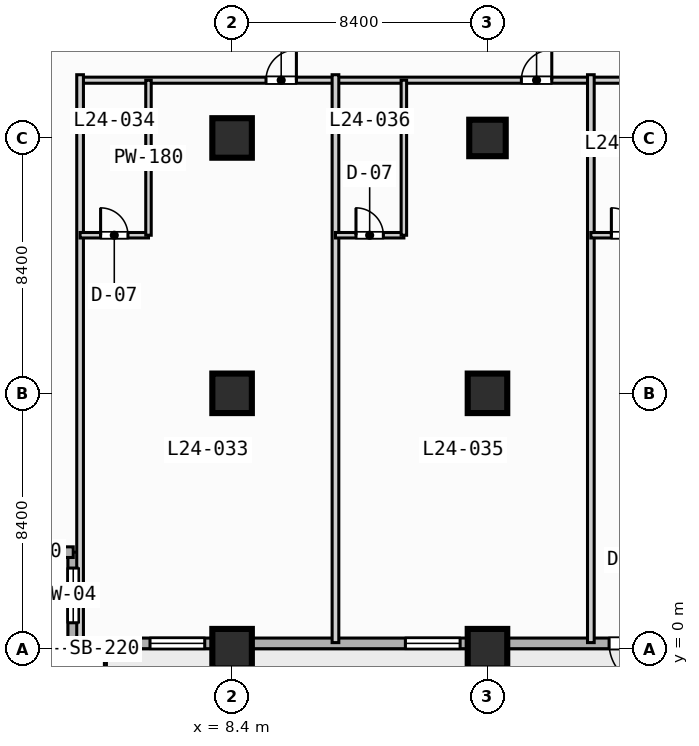
"""IFC4 building model, lengths in metres.
Left out: names, types, materials, properties, quantities, classifications, styles, units other than length and angle.
Written with IfcOpenShell. Run it as: python <this file> out.ifc"""

import sys

from ifc_helpers import new_model, si_unit, direction, frame, frame_2d, origin, origin_2d, place, context, subcontext, project, spatial, rectangle, extrude, element, fill, save


model = new_model("IFC4")
c1 = context("Model", 3, precision=1e-05, world=origin(), true_north=direction((0.0, 1.0)))
c2 = subcontext(c1, "Body", "Model", "MODEL_VIEW")
j1 = project(units=[si_unit("LENGTHUNIT", "METRE"), si_unit("PLANEANGLEUNIT", "RADIAN")], contexts=[c1])
p1 = place(None, origin())
s1 = spatial("IfcSite", under=j1, at=p1, CompositionType="ELEMENT")
p2 = place(p1, origin())
s2 = spatial("IfcBuilding", under=s1, at=p2, CompositionType="ELEMENT")
p3 = place(p2, frame((0.0, 0.0, 103.8)))
s3 = spatial("IfcBuildingStorey", under=s2, at=p3, CompositionType="ELEMENT", Elevation=103.8)
for number, where, z_axis, x_axis in (
    (1, (8.4, 0.0, 0.0), (0.0, 0.0, 1.0), (1.0, 0.0, 0.0)),
    (2, (8.4, 8.4, 0.0), (0.0, 0.0, 1.0), (1.0, 0.0, 0.0)),
    (3, (8.4, 16.8, 0.0), (0.0, 0.0, 1.0), (1.0, 0.0, 0.0)),
    (4, (16.8, 0.0, 0.0), (0.0, 0.0, 1.0), (1.0, 0.0, 0.0)),
    (5, (16.8, 8.4, 0.0), (0.0, 0.0, 1.0), (1.0, 0.0, 0.0)),
):
    element("IfcColumn", number, at=place(p3, frame(where, z_axis=z_axis, x_axis=x_axis)), inside=s3, PredefinedType="COLUMN", context=c2, shape_type="SweptSolid", body=[
        extrude(rectangle(XDim=1.3, YDim=1.3, at=origin_2d()), origin(), (0.0, 0.0, 1.0), 3.8),
    ])
p4 = place(p3, frame((16.8, 16.8, 0.0), z_axis=(0.0, 0.0, 1.0), x_axis=(1.0, 0.0, 0.0)))
e6 = element("IfcColumn", 6, at=p4, inside=s3, PredefinedType="COLUMN", context=c2, shape_type="SweptSolid", body=[
    extrude(rectangle(XDim=1.2, YDim=1.2, at=origin_2d()), origin(), (0.0, 0.0, 1.0), 3.8),
])
p5 = place(p3, frame((3.175, 0.175, 0.0), z_axis=(0.0, 0.0, 1.0), x_axis=(0.0, 1.0, 0.0)))
e7 = element("IfcWall", 7, at=p5, inside=s3, PredefinedType="STANDARD", context=c2, shape_type="SweptSolid", body=[
    extrude(rectangle(XDim=3.0, YDim=0.35, at=frame_2d((1.5, 0.0))), origin(), (0.0, 0.0, 1.0), 3.55),
])
p6 = place(p5, frame((0.677, 0.0, 0.85)))
e8 = element("IfcOpeningElement", 8, at=p6, cuts=e7, PredefinedType="OPENING", context=c2, shape_type="SweptSolid", body=[
    extrude(rectangle(XDim=1.8, YDim=1.8, at=frame_2d((0.9, 0.9))), frame((0.0, 0.185, 0.0), z_axis=(0.0, -1.0, 0.0), x_axis=(1.0, 0.0, 0.0)), (0.0, 0.0, 1.0), 0.37),
])
p7 = place(p3, frame((3.175, 3.175, 0.0), z_axis=(0.0, 0.0, 1.0), x_axis=(-1.0, 0.0, 0.0)))
e9 = element("IfcWall", 9, at=p7, inside=s3, PredefinedType="STANDARD", context=c2, shape_type="SweptSolid", body=[
    extrude(rectangle(XDim=3.0, YDim=0.35, at=frame_2d((1.5, 0.0))), origin(), (0.0, 0.0, 1.0), 3.55),
])
p8 = place(p3, frame((72.425, 0.175, 0.0), z_axis=(0.0, 0.0, 1.0), x_axis=(-1.0, 0.0, 0.0)))
e10 = element("IfcWall", 10, at=p8, inside=s3, PredefinedType="STANDARD", context=c2, shape_type="SweptSolid", body=[
    extrude(rectangle(XDim=69.25, YDim=0.35, at=frame_2d((34.625, 0.0))), origin(), (0.0, 0.0, 1.0), 3.55),
])
p9 = place(p8, frame((50.225, 0.0, 0.0)))
e11 = element("IfcOpeningElement", 11, at=p9, cuts=e10, PredefinedType="OPENING", context=c2, shape_type="SweptSolid", body=[
    extrude(rectangle(XDim=1.4, YDim=2.2, at=frame_2d((0.7, 1.1))), frame((0.0, 0.185, 0.0), z_axis=(0.0, -1.0, 0.0), x_axis=(1.0, 0.0, 0.0)), (0.0, 0.0, 1.0), 0.37),
])
p10 = place(p8, frame((33.525, 0.0, 0.85)))
e12 = element("IfcOpeningElement", 12, at=p10, cuts=e10, PredefinedType="OPENING", context=c2, shape_type="SweptSolid", body=[
    extrude(rectangle(XDim=2.2, YDim=1.8, at=frame_2d((1.1, 0.9))), frame((0.0, 0.185, 0.0), z_axis=(0.0, -1.0, 0.0), x_axis=(1.0, 0.0, 0.0)), (0.0, 0.0, 1.0), 0.37),
])
p11 = place(p8, frame((25.125, 0.0, 0.85)))
e13 = element("IfcOpeningElement", 13, at=p11, cuts=e10, PredefinedType="OPENING", context=c2, shape_type="SweptSolid", body=[
    extrude(rectangle(XDim=2.2, YDim=1.8, at=frame_2d((1.1, 0.9))), frame((0.0, 0.185, 0.0), z_axis=(0.0, -1.0, 0.0), x_axis=(1.0, 0.0, 0.0)), (0.0, 0.0, 1.0), 0.37),
])
p12 = place(p8, frame((8.325, 0.0, 0.85)))
e14 = element("IfcOpeningElement", 14, at=p12, cuts=e10, PredefinedType="OPENING", context=c2, shape_type="SweptSolid", body=[
    extrude(rectangle(XDim=2.2, YDim=1.8, at=frame_2d((1.1, 0.9))), frame((0.0, 0.185, 0.0), z_axis=(0.0, -1.0, 0.0), x_axis=(1.0, 0.0, 0.0)), (0.0, 0.0, 1.0), 0.37),
])
p13 = place(p8, frame((64.925, 0.0, 0.85)))
e15 = element("IfcOpeningElement", 15, at=p13, cuts=e10, PredefinedType="OPENING", context=c2, shape_type="SweptSolid", body=[
    extrude(rectangle(XDim=1.8, YDim=1.8, at=frame_2d((0.9, 0.9))), frame((0.0, 0.185, 0.0), z_axis=(0.0, -1.0, 0.0), x_axis=(1.0, 0.0, 0.0)), (0.0, 0.0, 1.0), 0.37),
])
p14 = place(p8, frame((56.525, 0.0, 0.85)))
e16 = element("IfcOpeningElement", 16, at=p14, cuts=e10, PredefinedType="OPENING", context=c2, shape_type="SweptSolid", body=[
    extrude(rectangle(XDim=1.8, YDim=1.8, at=frame_2d((0.9, 0.9))), frame((0.0, 0.185, 0.0), z_axis=(0.0, -1.0, 0.0), x_axis=(1.0, 0.0, 0.0)), (0.0, 0.0, 1.0), 0.37),
])
p15 = place(p8, frame((2.125, 0.0, 0.85)))
e17 = element("IfcOpeningElement", 17, at=p15, cuts=e10, PredefinedType="OPENING", context=c2, shape_type="SweptSolid", body=[
    extrude(rectangle(XDim=1.8, YDim=1.8, at=frame_2d((0.9, 0.9))), frame((0.0, 0.185, 0.0), z_axis=(0.0, -1.0, 0.0), x_axis=(1.0, 0.0, 0.0)), (0.0, 0.0, 1.0), 0.37),
])
p16 = place(p3, frame((3.4, 18.7, 0.0), z_axis=(0.0, 0.0, 1.0), x_axis=(1.0, 0.0, 0.0)))
e18 = element("IfcWall", 18, at=p16, inside=s3, PredefinedType="PARTITIONING", context=c2, shape_type="SweptSolid", body=[
    extrude(rectangle(XDim=35.8, YDim=0.2, at=frame_2d((17.9, 0.0))), origin(), (0.0, 0.0, 1.0), 3.55),
])
p17 = place(p16, frame((6.115, 0.0, 0.0)))
e19 = element("IfcOpeningElement", 19, at=p17, cuts=e18, PredefinedType="OPENING", context=c2, shape_type="SweptSolid", body=[
    extrude(rectangle(XDim=1.0, YDim=2.15, at=frame_2d((0.5, 1.075))), frame((0.0, 0.11, 0.0), z_axis=(0.0, -1.0, 0.0), x_axis=(1.0, 0.0, 0.0)), (0.0, 0.0, 1.0), 0.22),
])
p18 = place(p16, frame((14.515, 0.0, 0.0)))
e20 = element("IfcOpeningElement", 20, at=p18, cuts=e18, PredefinedType="OPENING", context=c2, shape_type="SweptSolid", body=[
    extrude(rectangle(XDim=1.0, YDim=2.15, at=frame_2d((0.5, 1.075))), frame((0.0, 0.11, 0.0), z_axis=(0.0, -1.0, 0.0), x_axis=(1.0, 0.0, 0.0)), (0.0, 0.0, 1.0), 0.22),
])
p19 = place(p16, frame((22.915, 0.0, 0.0)))
e21 = element("IfcOpeningElement", 21, at=p19, cuts=e18, PredefinedType="OPENING", context=c2, shape_type="SweptSolid", body=[
    extrude(rectangle(XDim=1.0, YDim=2.15, at=frame_2d((0.5, 1.075))), frame((0.0, 0.11, 0.0), z_axis=(0.0, -1.0, 0.0), x_axis=(1.0, 0.0, 0.0)), (0.0, 0.0, 1.0), 0.22),
])
p20 = place(p16, frame((31.165, 0.0, 0.0)))
e22 = element("IfcOpeningElement", 22, at=p20, cuts=e18, PredefinedType="OPENING", context=c2, shape_type="SweptSolid", body=[
    extrude(rectangle(XDim=1.0, YDim=2.15, at=frame_2d((0.5, 1.075))), frame((0.0, 0.11, 0.0), z_axis=(0.0, -1.0, 0.0), x_axis=(1.0, 0.0, 0.0)), (0.0, 0.0, 1.0), 0.22),
])
p21 = place(p3, frame((3.4, 0.2, 0.0), z_axis=(0.0, 0.0, 1.0), x_axis=(0.0, 1.0, 0.0)))
e23 = element("IfcWall", 23, at=p21, inside=s3, PredefinedType="PARTITIONING", context=c2, shape_type="SweptSolid", body=[
    extrude(rectangle(XDim=18.68, YDim=0.22, at=frame_2d((9.34, 0.0))), origin(), (0.0, 0.0, 1.0), 3.55),
])
p22 = place(p3, frame((3.4, 13.6, 0.0), z_axis=(0.0, 0.0, 1.0), x_axis=(1.0, 0.0, 0.0)))
e24 = element("IfcWall", 24, at=p22, inside=s3, PredefinedType="PLUMBINGWALL", context=c2, shape_type="SweptSolid", body=[
    extrude(rectangle(XDim=2.25, YDim=0.18, at=frame_2d((1.125, 0.0))), origin(), (0.0, 0.0, 1.0), 3.55),
])
p23 = place(p22, frame((0.675, 0.0, 0.0)))
e25 = element("IfcOpeningElement", 25, at=p23, cuts=e24, PredefinedType="OPENING", context=c2, shape_type="SweptSolid", body=[
    extrude(rectangle(XDim=0.9, YDim=2.1, at=frame_2d((0.45, 1.05))), frame((0.0, 0.1, 0.0), z_axis=(0.0, -1.0, 0.0), x_axis=(1.0, 0.0, 0.0)), (0.0, 0.0, 1.0), 0.2),
])
p24 = place(p3, frame((5.65, 13.6, 0.0), z_axis=(0.0, 0.0, 1.0), x_axis=(0.0, 1.0, 0.0)))
e26 = element("IfcWall", 26, at=p24, inside=s3, PredefinedType="PLUMBINGWALL", context=c2, shape_type="SweptSolid", body=[
    extrude(rectangle(XDim=5.1, YDim=0.18, at=frame_2d((2.55, 0.0))), origin(), (0.0, 0.0, 1.0), 3.55),
])
p25 = place(p3, frame((11.8, 0.2, 0.0), z_axis=(0.0, 0.0, 1.0), x_axis=(0.0, 1.0, 0.0)))
e27 = element("IfcWall", 27, at=p25, inside=s3, PredefinedType="PARTITIONING", context=c2, shape_type="SweptSolid", body=[
    extrude(rectangle(XDim=18.68, YDim=0.22, at=frame_2d((9.34, 0.0))), origin(), (0.0, 0.0, 1.0), 3.55),
])
p26 = place(p3, frame((11.8, 13.6, 0.0), z_axis=(0.0, 0.0, 1.0), x_axis=(1.0, 0.0, 0.0)))
e28 = element("IfcWall", 28, at=p26, inside=s3, PredefinedType="PLUMBINGWALL", context=c2, shape_type="SweptSolid", body=[
    extrude(rectangle(XDim=2.25, YDim=0.18, at=frame_2d((1.125, 0.0))), origin(), (0.0, 0.0, 1.0), 3.55),
])
p27 = place(p26, frame((0.675, 0.0, 0.0)))
e29 = element("IfcOpeningElement", 29, at=p27, cuts=e28, PredefinedType="OPENING", context=c2, shape_type="SweptSolid", body=[
    extrude(rectangle(XDim=0.9, YDim=2.1, at=frame_2d((0.45, 1.05))), frame((0.0, 0.1, 0.0), z_axis=(0.0, -1.0, 0.0), x_axis=(1.0, 0.0, 0.0)), (0.0, 0.0, 1.0), 0.2),
])
p28 = place(p3, frame((14.05, 13.6, 0.0), z_axis=(0.0, 0.0, 1.0), x_axis=(0.0, 1.0, 0.0)))
e30 = element("IfcWall", 30, at=p28, inside=s3, PredefinedType="PLUMBINGWALL", context=c2, shape_type="SweptSolid", body=[
    extrude(rectangle(XDim=5.1, YDim=0.18, at=frame_2d((2.55, 0.0))), origin(), (0.0, 0.0, 1.0), 3.55),
])
p29 = place(p3, frame((20.2, 0.2, 0.0), z_axis=(0.0, 0.0, 1.0), x_axis=(0.0, 1.0, 0.0)))
e31 = element("IfcWall", 31, at=p29, inside=s3, PredefinedType="PARTITIONING", context=c2, shape_type="SweptSolid", body=[
    extrude(rectangle(XDim=18.68, YDim=0.22, at=frame_2d((9.34, 0.0))), origin(), (0.0, 0.0, 1.0), 3.55),
])
p30 = place(p3, frame((20.2, 13.6, 0.0), z_axis=(0.0, 0.0, 1.0), x_axis=(1.0, 0.0, 0.0)))
e32 = element("IfcWall", 32, at=p30, inside=s3, PredefinedType="PLUMBINGWALL", context=c2, shape_type="SweptSolid", body=[
    extrude(rectangle(XDim=2.25, YDim=0.18, at=frame_2d((1.125, 0.0))), origin(), (0.0, 0.0, 1.0), 3.55),
])
p31 = place(p30, frame((0.675, 0.0, 0.0)))
e33 = element("IfcOpeningElement", 33, at=p31, cuts=e32, PredefinedType="OPENING", context=c2, shape_type="SweptSolid", body=[
    extrude(rectangle(XDim=0.9, YDim=2.1, at=frame_2d((0.45, 1.05))), frame((0.0, 0.1, 0.0), z_axis=(0.0, -1.0, 0.0), x_axis=(1.0, 0.0, 0.0)), (0.0, 0.0, 1.0), 0.2),
])
p32 = place(p6, origin())
e34 = element("IfcWindow", 34, at=p32, inside=s3, PartitioningType="SINGLE_PANEL", PredefinedType="WINDOW", context=c2, shape_type="SweptSolid", body=[
    extrude(rectangle(XDim=1.8, YDim=1.8, at=frame_2d((0.9, 0.9))), frame((0.0, 0.03, 0.0), z_axis=(0.0, -1.0, 0.0), x_axis=(1.0, 0.0, 0.0)), (0.0, 0.0, 1.0), 0.06),
])
fill(e8, e34)
p33 = place(p9, origin())
e35 = element("IfcDoor", 35, at=p33, inside=s3, OperationType="SINGLE_SWING_LEFT", PredefinedType="DOOR", context=c2, shape_type="SweptSolid", body=[
    extrude(rectangle(XDim=1.4, YDim=2.2, at=frame_2d((0.7, 1.1))), frame((0.0, 0.025, 0.0), z_axis=(0.0, -1.0, 0.0), x_axis=(1.0, 0.0, 0.0)), (0.0, 0.0, 1.0), 0.05),
])
fill(e11, e35)
p34 = place(p13, origin())
e36 = element("IfcWindow", 36, at=p34, inside=s3, PartitioningType="SINGLE_PANEL", PredefinedType="WINDOW", context=c2, shape_type="SweptSolid", body=[
    extrude(rectangle(XDim=1.8, YDim=1.8, at=frame_2d((0.9, 0.9))), frame((0.0, 0.03, 0.0), z_axis=(0.0, -1.0, 0.0), x_axis=(1.0, 0.0, 0.0)), (0.0, 0.0, 1.0), 0.06),
])
fill(e15, e36)
p35 = place(p14, origin())
e37 = element("IfcWindow", 37, at=p35, inside=s3, PartitioningType="SINGLE_PANEL", PredefinedType="WINDOW", context=c2, shape_type="SweptSolid", body=[
    extrude(rectangle(XDim=1.8, YDim=1.8, at=frame_2d((0.9, 0.9))), frame((0.0, 0.03, 0.0), z_axis=(0.0, -1.0, 0.0), x_axis=(1.0, 0.0, 0.0)), (0.0, 0.0, 1.0), 0.06),
])
fill(e16, e37)
p36 = place(p17, origin())
e38 = element("IfcDoor", 38, at=p36, inside=s3, OperationType="SINGLE_SWING_RIGHT", PredefinedType="DOOR", context=c2, shape_type="SweptSolid", body=[
    extrude(rectangle(XDim=1.0, YDim=2.15, at=frame_2d((0.5, 1.075))), frame((0.0, 0.025, 0.0), z_axis=(0.0, -1.0, 0.0), x_axis=(1.0, 0.0, 0.0)), (0.0, 0.0, 1.0), 0.05),
])
fill(e19, e38)
p37 = place(p18, origin())
e39 = element("IfcDoor", 39, at=p37, inside=s3, OperationType="SINGLE_SWING_RIGHT", PredefinedType="DOOR", context=c2, shape_type="SweptSolid", body=[
    extrude(rectangle(XDim=1.0, YDim=2.15, at=frame_2d((0.5, 1.075))), frame((0.0, 0.025, 0.0), z_axis=(0.0, -1.0, 0.0), x_axis=(1.0, 0.0, 0.0)), (0.0, 0.0, 1.0), 0.05),
])
fill(e20, e39)
p38 = place(p23, origin())
e40 = element("IfcDoor", 40, at=p38, inside=s3, OperationType="SINGLE_SWING_LEFT", PredefinedType="DOOR", context=c2, shape_type="SweptSolid", body=[
    extrude(rectangle(XDim=0.9, YDim=2.1, at=frame_2d((0.45, 1.05))), frame((0.0, 0.025, 0.0), z_axis=(0.0, -1.0, 0.0), x_axis=(1.0, 0.0, 0.0)), (0.0, 0.0, 1.0), 0.05),
])
fill(e25, e40)
p39 = place(p27, origin())
e41 = element("IfcDoor", 41, at=p39, inside=s3, OperationType="SINGLE_SWING_LEFT", PredefinedType="DOOR", context=c2, shape_type="SweptSolid", body=[
    extrude(rectangle(XDim=0.9, YDim=2.1, at=frame_2d((0.45, 1.05))), frame((0.0, 0.025, 0.0), z_axis=(0.0, -1.0, 0.0), x_axis=(1.0, 0.0, 0.0)), (0.0, 0.0, 1.0), 0.05),
])
fill(e29, e41)
p40 = place(p31, origin())
e42 = element("IfcDoor", 42, at=p40, inside=s3, OperationType="SINGLE_SWING_LEFT", PredefinedType="DOOR", context=c2, shape_type="SweptSolid", body=[
    extrude(rectangle(XDim=0.9, YDim=2.1, at=frame_2d((0.45, 1.05))), frame((0.0, 0.025, 0.0), z_axis=(0.0, -1.0, 0.0), x_axis=(1.0, 0.0, 0.0)), (0.0, 0.0, 1.0), 0.05),
])
fill(e33, e42)
save(model, sys.argv[1])
